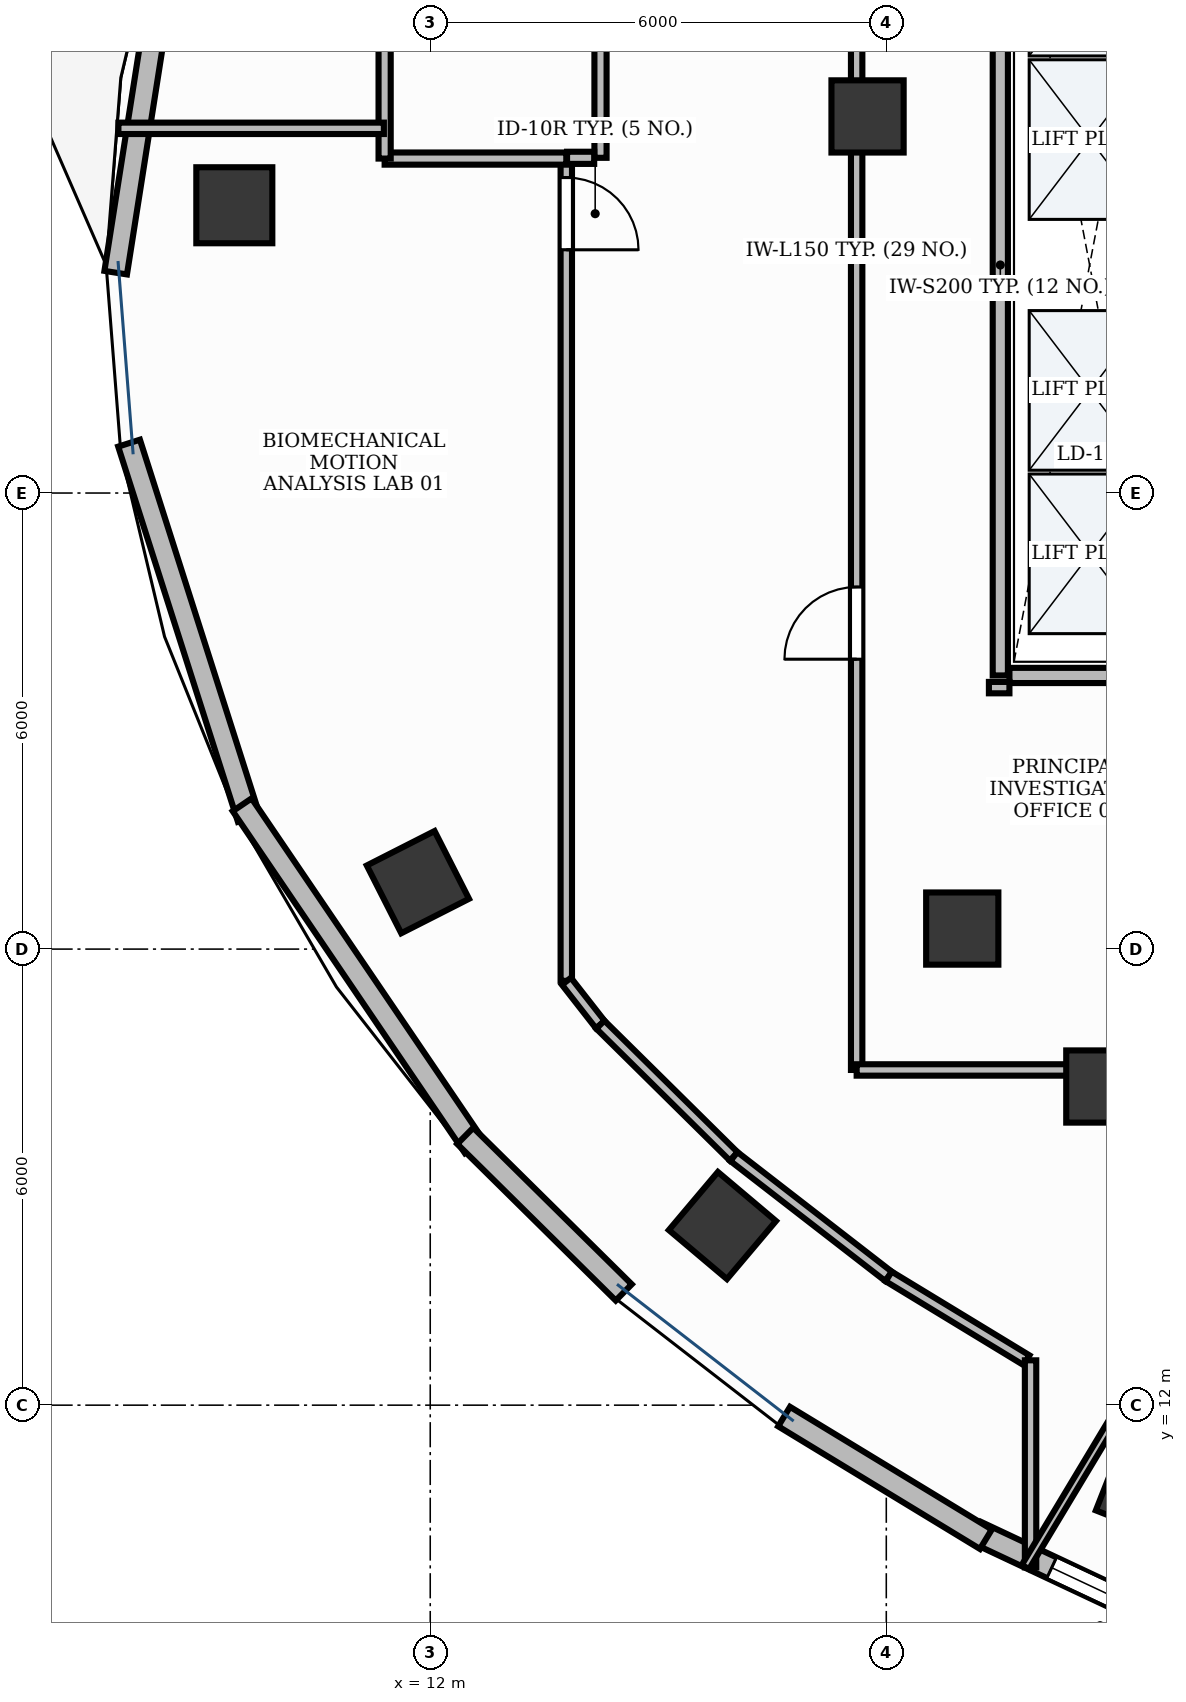
"""IFC4 building model, lengths in metres.
Left out: names, types, materials, properties, quantities, classifications, styles, units other than length and angle.
Written with IfcOpenShell. Run it as: python <this file> out.ifc"""

import sys

from ifc_helpers import new_model, si_unit, direction, frame, frame_2d, origin, origin_2d, place, context, subcontext, project, spatial, rectangle, extrude, element, fill, save


model = new_model("IFC4")
c1 = context("Model", 3, precision=1e-05, world=origin(), true_north=direction((0.0, 1.0)))
c2 = subcontext(c1, "Body", "Model", "MODEL_VIEW")
j1 = project(units=[si_unit("LENGTHUNIT", "METRE"), si_unit("PLANEANGLEUNIT", "RADIAN")], contexts=[c1])
p1 = place(None, origin())
s1 = spatial("IfcSite", under=j1, at=p1, CompositionType="ELEMENT")
p2 = place(p1, origin())
s2 = spatial("IfcBuilding", under=s1, at=p2, CompositionType="ELEMENT")
p3 = place(p2, frame((0.0, 0.0, 196.2)))
s3 = spatial("IfcBuildingStorey", under=s2, at=p3, CompositionType="ELEMENT", Elevation=196.2)
p4 = place(p3, frame((9.423, 27.786, -0.0), z_axis=(0.0, 0.0, 1.0), x_axis=(0.0, 1.0, 0.0)))
e1 = element("IfcColumn", 1, at=p4, inside=s3, PredefinedType="COLUMN", context=c2, shape_type="SweptSolid", body=[
    extrude(rectangle(XDim=1.0, YDim=1.0, at=origin_2d()), origin(), (0.0, 0.0, 1.0), 3.901),
])
p5 = place(p3, frame((17.753, 28.955, -0.0), z_axis=(0.0, 0.0, 1.0), x_axis=(1.0, 0.0, 0.0)))
e2 = element("IfcColumn", 2, at=p5, inside=s3, PredefinedType="COLUMN", context=c2, shape_type="SweptSolid", body=[
    extrude(rectangle(XDim=0.95, YDim=0.95, at=origin_2d()), origin(), (0.0, 0.0, 1.0), 3.901),
])
p6 = place(p3, frame((11.838, 18.881, -0.0), z_axis=(0.0, 0.0, 1.0), x_axis=(-0.453057191132, 0.891481453292, 0.0)))
e3 = element("IfcColumn", 3, at=p6, inside=s3, PredefinedType="COLUMN", context=c2, shape_type="SweptSolid", body=[
    extrude(rectangle(XDim=1.0, YDim=1.0, at=origin_2d()), origin(), (0.0, 0.0, 1.0), 3.901),
])
p7 = place(p3, frame((19.0, 18.27, -0.0), z_axis=(0.0, 0.0, 1.0), x_axis=(1.0, 0.0, 0.0)))
e4 = element("IfcColumn", 4, at=p7, inside=s3, PredefinedType="COLUMN", context=c2, shape_type="SweptSolid", body=[
    extrude(rectangle(XDim=0.95, YDim=0.95, at=origin_2d()), origin(), (0.0, 0.0, 1.0), 3.901),
])
p8 = place(p3, frame((15.844, 14.363, -0.0), z_axis=(0.0, 0.0, 1.0), x_axis=(-0.764246456939, 0.644924300253, 0.0)))
e5 = element("IfcColumn", 5, at=p8, inside=s3, PredefinedType="COLUMN", context=c2, shape_type="SweptSolid", body=[
    extrude(rectangle(XDim=1.0, YDim=1.0, at=origin_2d()), origin(), (0.0, 0.0, 1.0), 3.901),
])
p9 = place(p3, frame((20.842, 16.192, -0.0), z_axis=(0.0, 0.0, 1.0), x_axis=(1.0, 0.0, 0.0)))
e6 = element("IfcColumn", 6, at=p9, inside=s3, PredefinedType="COLUMN", context=c2, shape_type="SweptSolid", body=[
    extrude(rectangle(XDim=0.95, YDim=0.95, at=origin_2d()), origin(), (0.0, 0.0, 1.0), 3.901),
])
p10 = place(p3, frame((21.406, 10.897, -0.0), z_axis=(0.0, 0.0, 1.0), x_axis=(-0.930225540858, 0.366988341962, 0.0)))
e7 = element("IfcColumn", 7, at=p10, inside=s3, PredefinedType="COLUMN", context=c2, shape_type="SweptSolid", body=[
    extrude(rectangle(XDim=1.0, YDim=1.0, at=origin_2d()), origin(), (0.0, 0.0, 1.0), 3.901),
])
p11 = place(p3, frame((19.183, 10.329, 0.0), z_axis=(0.0, 0.0, 1.0), x_axis=(0.905013842092, -0.425382117186, 0.0)))
e8 = element("IfcWall", 8, at=p11, inside=s3, PredefinedType="STANDARD", context=c2, shape_type="SweptSolid", body=[
    extrude(rectangle(XDim=3.146, YDim=0.3, at=frame_2d((1.573, 0.0))), origin(), (0.0, 0.0, 1.0), 3.9),
])
p12 = place(p11, frame((1.097, 0.0, 0.9)))
e9 = element("IfcOpeningElement", 9, at=p12, cuts=e8, PredefinedType="OPENING", context=c2, shape_type="SweptSolid", body=[
    extrude(rectangle(XDim=1.8, YDim=2.1, at=frame_2d((0.9, 1.05))), frame((0.0, 0.165, 0.0), z_axis=(0.0, -1.0, 0.0), x_axis=(1.0, 0.0, 0.0)), (0.0, 0.0, 1.0), 0.33),
])
p13 = place(p3, frame((8.655, 31.947, 0.0), z_axis=(0.0, 0.0, 1.0), x_axis=(-0.155280464429, -0.987870425393, 0.0)))
e10 = element("IfcWall", 10, at=p13, inside=s3, PredefinedType="STANDARD", context=c2, shape_type="SweptSolid", body=[
    extrude(rectangle(XDim=5.11, YDim=0.3, at=frame_2d((2.555, 0.0))), origin(), (0.0, 0.0, 1.0), 3.9),
])
p14 = place(p3, frame((8.038, 24.656, 0.0), z_axis=(0.0, 0.0, 1.0), x_axis=(0.303930984078, -0.952694052106, 0.0)))
e11 = element("IfcWall", 11, at=p14, inside=s3, PredefinedType="STANDARD", context=c2, shape_type="SweptSolid", body=[
    extrude(rectangle(XDim=5.181, YDim=0.3, at=frame_2d((2.591, 0.0))), origin(), (0.0, 0.0, 1.0), 3.9),
])
p15 = place(p3, frame((9.526, 19.898, 0.0), z_axis=(0.0, 0.0, 1.0), x_axis=(0.561663900064, -0.827365495634, 0.0)))
e12 = element("IfcWall", 12, at=p15, inside=s3, PredefinedType="STANDARD", context=c2, shape_type="SweptSolid", body=[
    extrude(rectangle(XDim=5.438, YDim=0.3, at=frame_2d((2.719, 0.0))), origin(), (0.0, 0.0, 1.0), 3.9),
])
p16 = place(p3, frame((12.461, 15.543, 0.0), z_axis=(0.0, 0.0, 1.0), x_axis=(0.711508162911, -0.702677830951, 0.0)))
e13 = element("IfcWall", 13, at=p16, inside=s3, PredefinedType="STANDARD", context=c2, shape_type="SweptSolid", body=[
    extrude(rectangle(XDim=2.931, YDim=0.3, at=frame_2d((1.465, 0.0))), origin(), (0.0, 0.0, 1.0), 3.9),
])
p17 = place(p3, frame((16.656, 11.85, 0.0), z_axis=(0.0, 0.0, 1.0), x_axis=(0.854580756668, -0.519318524928, 0.0)))
e14 = element("IfcWall", 14, at=p17, inside=s3, PredefinedType="STANDARD", context=c2, shape_type="SweptSolid", body=[
    extrude(rectangle(XDim=3.106, YDim=0.3, at=frame_2d((1.553, 0.0))), origin(), (0.0, 0.0, 1.0), 3.9),
])
p18 = place(p3, frame((19.5, 21.6, 0.0), z_axis=(0.0, 0.0, 1.0), x_axis=(0.0, 1.0, 0.0)))
e15 = element("IfcWall", 15, at=p18, inside=s3, PredefinedType="PARTITIONING", context=c2, shape_type="SweptSolid", body=[
    extrude(rectangle(XDim=10.8, YDim=0.2, at=frame_2d((5.4, 0.0))), origin(), (0.0, 0.0, 1.0), 2.22),
])
p19 = place(p3, frame((19.62, 21.6, 0.0), z_axis=(0.0, 0.0, 1.0), x_axis=(1.0, 0.0, 0.0)))
e16 = element("IfcWall", 16, at=p19, inside=s3, PredefinedType="PARTITIONING", context=c2, shape_type="SweptSolid", body=[
    extrude(rectangle(XDim=2.11, YDim=0.2, at=frame_2d((1.055, 0.0))), origin(), (0.0, 0.0, 1.0), 2.22),
])
p20 = place(p3, frame((14.24, 31.99, 0.0), z_axis=(0.0, 0.0, 1.0), x_axis=(0.0, -1.0, 0.0)))
e17 = element("IfcWall", 17, at=p20, inside=s3, PredefinedType="PARTITIONING", context=c2, shape_type="SweptSolid", body=[
    extrude(rectangle(XDim=3.58, YDim=0.16, at=frame_2d((1.79, 0.0))), origin(), (0.0, 0.0, 1.0), 2.22),
])
p21 = place(p20, frame((0.24, 0.0, 0.0)))
e18 = element("IfcOpeningElement", 18, at=p21, cuts=e17, PredefinedType="OPENING", context=c2, shape_type="SweptSolid", body=[
    extrude(rectangle(XDim=0.95, YDim=2.15, at=frame_2d((0.475, 1.075))), frame((0.0, 0.095, 0.0), z_axis=(0.0, -1.0, 0.0), x_axis=(1.0, 0.0, 0.0)), (0.0, 0.0, 1.0), 0.19),
])
p22 = place(p3, frame((13.79, 28.39, 0.0), z_axis=(0.0, 0.0, 1.0), x_axis=(0.0, -1.0, 0.0)))
e19 = element("IfcWall", 19, at=p22, inside=s3, PredefinedType="PARTITIONING", context=c2, shape_type="SweptSolid", body=[
    extrude(rectangle(XDim=10.807, YDim=0.15, at=frame_2d((5.404, 0.0))), origin(), (0.0, 0.0, 1.0), 2.22),
])
p23 = place(p22, frame((0.24, 0.0, 0.0)))
e20 = element("IfcOpeningElement", 20, at=p23, cuts=e19, PredefinedType="OPENING", context=c2, shape_type="SweptSolid", body=[
    extrude(rectangle(XDim=0.95, YDim=2.15, at=frame_2d((0.475, 1.075))), frame((0.0, 0.09, 0.0), z_axis=(0.0, -1.0, 0.0), x_axis=(1.0, 0.0, 0.0)), (0.0, 0.0, 1.0), 0.18),
])
p24 = place(p3, frame((17.61, 16.41, 0.0), z_axis=(0.0, 0.0, 1.0), x_axis=(0.0, 1.0, 0.0)))
e21 = element("IfcWall", 21, at=p24, inside=s3, PredefinedType="PARTITIONING", context=c2, shape_type="SweptSolid", body=[
    extrude(rectangle(XDim=14.969, YDim=0.15, at=frame_2d((7.484, 0.0))), origin(), (0.0, 0.0, 1.0), 2.22),
])
p25 = place(p24, frame((5.404, 0.0, 0.0)))
e22 = element("IfcOpeningElement", 22, at=p25, cuts=e21, PredefinedType="OPENING", context=c2, shape_type="SweptSolid", body=[
    extrude(rectangle(XDim=0.95, YDim=2.15, at=frame_2d((0.475, 1.075))), frame((0.0, 0.09, 0.0), z_axis=(0.0, -1.0, 0.0), x_axis=(1.0, 0.0, 0.0)), (0.0, 0.0, 1.0), 0.18),
])
p26 = place(p3, frame((14.157, 28.41, 0.0), z_axis=(0.0, 0.0, 1.0), x_axis=(-1.0, 0.0, 0.0)))
e23 = element("IfcWall", 23, at=p26, inside=s3, PredefinedType="PARTITIONING", context=c2, shape_type="SweptSolid", body=[
    extrude(rectangle(XDim=0.357, YDim=0.16, at=frame_2d((0.178, 0.0))), origin(), (0.0, 0.0, 1.0), 2.22),
])
p27 = place(p3, frame((13.79, 28.4, 0.0), z_axis=(0.0, 0.0, 1.0), x_axis=(-1.0, 0.0, 0.0)))
e24 = element("IfcWall", 24, at=p27, inside=s3, PredefinedType="PARTITIONING", context=c2, shape_type="SweptSolid", body=[
    extrude(rectangle(XDim=2.39, YDim=0.16, at=frame_2d((1.195, 0.0))), origin(), (0.0, 0.0, 1.0), 2.22),
])
p28 = place(p3, frame((11.4, 28.4, 0.0), z_axis=(0.0, 0.0, 1.0), x_axis=(0.0, 1.0, 0.0)))
e25 = element("IfcWall", 25, at=p28, inside=s3, PredefinedType="PARTITIONING", context=c2, shape_type="SweptSolid", body=[
    extrude(rectangle(XDim=3.6, YDim=0.16, at=frame_2d((1.8, 0.0))), origin(), (0.0, 0.0, 1.0), 2.22),
])
p29 = place(p3, frame((7.898, 28.798, 0.0), z_axis=(0.0, 0.0, 1.0), x_axis=(1.0, 0.0, 0.0)))
e26 = element("IfcWall", 26, at=p29, inside=s3, PredefinedType="PARTITIONING", context=c2, shape_type="SweptSolid", body=[
    extrude(rectangle(XDim=3.492, YDim=0.15, at=frame_2d((1.746, 0.0))), origin(), (0.0, 0.0, 1.0), 2.22),
])
p30 = place(p3, frame((13.792, 17.576, 0.0), z_axis=(0.0, 0.0, 1.0), x_axis=(0.615925776879, -0.787804187204, 0.0)))
e27 = element("IfcWall", 27, at=p30, inside=s3, PredefinedType="PARTITIONING", context=c2, shape_type="SweptSolid", body=[
    extrude(rectangle(XDim=0.723, YDim=0.15, at=frame_2d((0.361, 0.0))), origin(), (0.0, 0.0, 1.0), 2.22),
])
p31 = place(p3, frame((14.238, 17.006, 0.0), z_axis=(0.0, 0.0, 1.0), x_axis=(0.711447157113, -0.702739598027, 0.0)))
e28 = element("IfcWall", 28, at=p31, inside=s3, PredefinedType="PARTITIONING", context=c2, shape_type="SweptSolid", body=[
    extrude(rectangle(XDim=2.467, YDim=0.15, at=frame_2d((1.234, 0.0))), origin(), (0.0, 0.0, 1.0), 2.22),
])
p32 = place(p3, frame((15.995, 15.271, 0.0), z_axis=(0.0, 0.0, 1.0), x_axis=(0.790550458789, -0.61239690733, 0.0)))
e29 = element("IfcWall", 29, at=p32, inside=s3, PredefinedType="PARTITIONING", context=c2, shape_type="SweptSolid", body=[
    extrude(rectangle(XDim=2.575, YDim=0.15, at=frame_2d((1.288, 0.0))), origin(), (0.0, 0.0, 1.0), 2.22),
])
p33 = place(p3, frame((18.031, 13.694, 0.0), z_axis=(0.0, 0.0, 1.0), x_axis=(0.85454497186, -0.51937740716, 0.0)))
e30 = element("IfcWall", 30, at=p33, inside=s3, PredefinedType="PARTITIONING", context=c2, shape_type="SweptSolid", body=[
    extrude(rectangle(XDim=2.122, YDim=0.15, at=frame_2d((1.061, 0.0))), origin(), (0.0, 0.0, 1.0), 2.22),
])
p34 = place(p3, frame((19.898, 12.59, 0.0), z_axis=(0.0, 0.0, 1.0), x_axis=(0.0, -1.0, 0.0)))
e31 = element("IfcWall", 31, at=p34, inside=s3, PredefinedType="PARTITIONING", context=c2, shape_type="SweptSolid", body=[
    extrude(rectangle(XDim=2.724, YDim=0.15, at=frame_2d((1.362, 0.0))), origin(), (0.0, 0.0, 1.0), 2.22),
])
p35 = place(p3, frame((19.35, 21.44, 0.0), z_axis=(0.0, 0.0, 1.0), x_axis=(1.0, 0.0, 0.0)))
e32 = element("IfcWall", 32, at=p35, inside=s3, PredefinedType="PARTITIONING", context=c2, shape_type="SweptSolid", body=[
    extrude(rectangle(XDim=0.27, YDim=0.15, at=frame_2d((0.135, 0.0))), origin(), (0.0, 0.0, 1.0), 2.22),
])
p36 = place(p3, frame((23.755, 16.41, 0.0), z_axis=(0.0, 0.0, 1.0), x_axis=(-1.0, 0.0, 0.0)))
e33 = element("IfcWall", 33, at=p36, inside=s3, PredefinedType="PARTITIONING", context=c2, shape_type="SweptSolid", body=[
    extrude(rectangle(XDim=6.145, YDim=0.15, at=frame_2d((3.072, 0.0))), origin(), (0.0, 0.0, 1.0), 2.22),
])
p37 = place(p3, frame((19.831, 9.871, 0.0), z_axis=(0.0, 0.0, 1.0), x_axis=(0.51499369767, 0.857193963675, 0.0)))
e34 = element("IfcWall", 34, at=p37, inside=s3, PredefinedType="MOVABLE", context=c2, shape_type="SweptSolid", body=[
    extrude(rectangle(XDim=3.172, YDim=0.11, at=frame_2d((1.586, 0.0))), origin(), (0.0, 0.0, 1.0), 2.22),
])
p38 = place(p12, origin())
e35 = element("IfcWindow", 35, at=p38, inside=s3, PartitioningType="SINGLE_PANEL", PredefinedType="WINDOW", context=c2, shape_type="SweptSolid", body=[
    extrude(rectangle(XDim=1.8, YDim=2.1, at=frame_2d((0.9, 1.05))), frame((0.0, 0.03, 0.0), z_axis=(0.0, -1.0, 0.0), x_axis=(1.0, 0.0, 0.0)), (0.0, 0.0, 1.0), 0.06),
])
fill(e9, e35)
p39 = place(p23, origin())
e36 = element("IfcDoor", 36, at=p39, inside=s3, OperationType="SINGLE_SWING_RIGHT", PredefinedType="DOOR", context=c2, shape_type="SweptSolid", body=[
    extrude(rectangle(XDim=0.95, YDim=2.15, at=frame_2d((0.475, 1.075))), frame((0.0, 0.025, 0.0), z_axis=(0.0, -1.0, 0.0), x_axis=(1.0, 0.0, 0.0)), (0.0, 0.0, 1.0), 0.05),
])
fill(e20, e36)
p40 = place(p25, origin())
e37 = element("IfcDoor", 37, at=p40, inside=s3, OperationType="SINGLE_SWING_LEFT", PredefinedType="DOOR", context=c2, shape_type="SweptSolid", body=[
    extrude(rectangle(XDim=0.95, YDim=2.15, at=frame_2d((0.475, 1.075))), frame((0.0, 0.025, 0.0), z_axis=(0.0, -1.0, 0.0), x_axis=(1.0, 0.0, 0.0)), (0.0, 0.0, 1.0), 0.05),
])
fill(e22, e37)
save(model, sys.argv[1])
